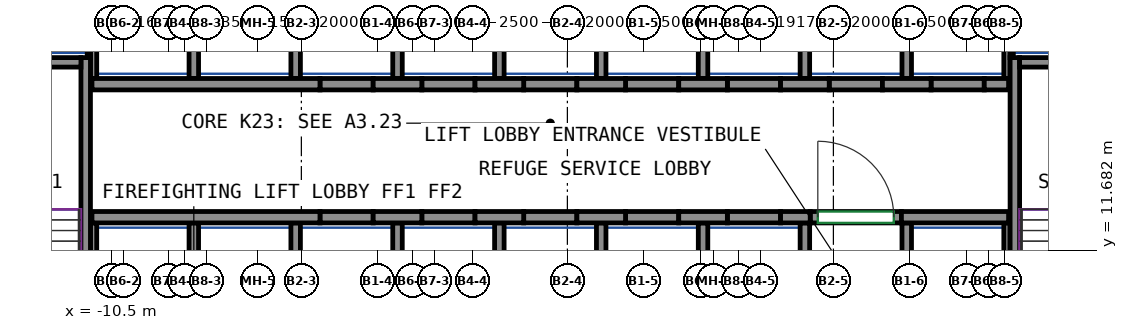
"""IFC4 building model, lengths in metres.
Left out: names, types, materials, properties, quantities, classifications, styles, units other than length and angle.
Written with IfcOpenShell. Run it as: python <this file> out.ifc"""

import sys

from ifc_helpers import new_model, si_unit, direction, frame, frame_2d, origin, place, context, subcontext, project, spatial, rectangle, extrude, source, transform, mapped, element, fill, save


model = new_model("IFC4")
c1 = context("Model", 3, precision=1e-05, world=origin(), true_north=direction((0.0, 1.0)))
c2 = subcontext(c1, "Body", "Model", "MODEL_VIEW")
j1 = project(units=[si_unit("LENGTHUNIT", "METRE"), si_unit("PLANEANGLEUNIT", "RADIAN")], contexts=[c1])
p1 = place(None, origin())
s1 = spatial("IfcSite", under=j1, at=p1, CompositionType="ELEMENT")
p2 = place(p1, origin())
s2 = spatial("IfcBuilding", under=s1, at=p2, CompositionType="ELEMENT")
p3 = place(p2, frame((0.0, 0.0, 95.2)))
s3 = spatial("IfcBuildingStorey", under=s2, at=p3, CompositionType="ELEMENT", Elevation=95.2)
m1 = source(origin(), c2, "Body", "SweptSolid", [
    extrude(rectangle(XDim=7.75, YDim=0.25, at=frame_2d((3.875, 0.0))), origin(), (0.0, 0.0, 1.0), 5.0),
])
p4 = place(p3, frame((-11.175, 9.0, 0.0), z_axis=(0.0, 0.0, 1.0), x_axis=(0.0, 1.0, 0.0)))
e1 = element("IfcWall", 1, at=p4, inside=s3, PredefinedType="SHEAR", context=c2, shape_type="MappedRepresentation", body=[
    mapped(m1, transform((0.0, 0.0, 0.0))),
])
m2 = source(origin(), c2, "Body", "SweptSolid", [
    extrude(rectangle(XDim=3.7, YDim=0.25, at=frame_2d((1.85, 0.0))), origin(), (0.0, 0.0, 1.0), 5.0),
])
p5 = place(p3, frame((-15.0, 16.625, 0.0), z_axis=(0.0, 0.0, 1.0), x_axis=(1.0, 0.0, 0.0)))
e2 = element("IfcWall", 2, at=p5, inside=s3, PredefinedType="SHEAR", context=c2, shape_type="MappedRepresentation", body=[
    mapped(m2, transform((0.0, 0.0, 0.0))),
])
p6 = place(p3, frame((13.275, 9.0, 0.0), z_axis=(0.0, 0.0, 1.0), x_axis=(0.0, 1.0, 0.0)))
e3 = element("IfcWall", 3, at=p6, inside=s3, PredefinedType="SHEAR", context=c2, shape_type="MappedRepresentation", body=[
    mapped(m1, transform((0.0, 0.0, 0.0))),
])
m3 = source(origin(), c2, "Body", "SweptSolid", [
    extrude(rectangle(XDim=3.7, YDim=0.25, at=frame_2d((1.85, 0.0))), origin(), (0.0, 0.0, 1.0), 5.0),
])
p7 = place(p3, frame((13.4, 16.625, 0.0), z_axis=(0.0, 0.0, 1.0), x_axis=(1.0, 0.0, 0.0)))
e4 = element("IfcWall", 4, at=p7, inside=s3, PredefinedType="SHEAR", context=c2, shape_type="MappedRepresentation", body=[
    mapped(m3, transform((0.0, 0.0, 0.0))),
])
m4 = source(origin(), c2, "Body", "SweptSolid", [
    extrude(rectangle(XDim=6.0, YDim=0.3, at=frame_2d((3.0, 0.0))), origin(), (0.0, 0.0, 1.0), 5.0),
])
p8 = place(p3, frame((-11.01, 12.55, 0.0), z_axis=(0.0, 0.0, 1.0), x_axis=(1.0, 0.0, 0.0)))
e5 = element("IfcWall", 5, at=p8, inside=s3, PredefinedType="SHEAR", context=c2, shape_type="MappedRepresentation", body=[
    mapped(m4, transform((0.0, 0.0, 0.0))),
])
m5 = source(origin(), c2, "Body", "SweptSolid", [
    extrude(rectangle(XDim=1.28, YDim=0.3, at=frame_2d((0.64, 0.0))), origin(), (0.0, 0.0, 1.0), 5.0),
])
for number, where, z_axis, x_axis in (
    (6, (-3.61, 12.55, 0.0), (0.0, 0.0, 1.0), (1.0, 0.0, 0.0)),
    (7, (-0.93, 12.55, 0.0), (0.0, 0.0, 1.0), (1.0, 0.0, 0.0)),
    (8, (1.75, 12.55, 0.0), (0.0, 0.0, 1.0), (1.0, 0.0, 0.0)),
    (9, (4.43, 12.55, 0.0), (0.0, 0.0, 1.0), (1.0, 0.0, 0.0)),
):
    element("IfcWall", number, at=place(p3, frame(where, z_axis=z_axis, x_axis=x_axis)), inside=s3, PredefinedType="SHEAR", context=c2, shape_type="MappedRepresentation", body=[
        mapped(m5, transform((0.0, 0.0, 0.0))),
    ])
m6 = source(origin(), c2, "Body", "SweptSolid", [
    extrude(rectangle(XDim=0.78, YDim=0.3, at=frame_2d((0.39, 0.0))), origin(), (0.0, 0.0, 1.0), 5.0),
])
p9 = place(p3, frame((7.11, 12.55, 0.0), z_axis=(0.0, 0.0, 1.0), x_axis=(1.0, 0.0, 0.0)))
e10 = element("IfcWall", 10, at=p9, inside=s3, PredefinedType="SHEAR", context=c2, shape_type="MappedRepresentation", body=[
    mapped(m6, transform((0.0, 0.0, 0.0))),
])
m7 = source(origin(), c2, "Body", "SweptSolid", [
    extrude(rectangle(XDim=2.82, YDim=0.3, at=frame_2d((1.41, 0.0))), origin(), (0.0, 0.0, 1.0), 5.0),
])
p10 = place(p3, frame((10.29, 12.55, 0.0), z_axis=(0.0, 0.0, 1.0), x_axis=(1.0, 0.0, 0.0)))
e11 = element("IfcWall", 11, at=p10, inside=s3, PredefinedType="SHEAR", context=c2, shape_type="MappedRepresentation", body=[
    mapped(m7, transform((0.0, 0.0, 0.0))),
])
p11 = place(p3, frame((-11.01, 16.05, 0.0), z_axis=(0.0, 0.0, 1.0), x_axis=(1.0, 0.0, 0.0)))
e12 = element("IfcWall", 12, at=p11, inside=s3, PredefinedType="SHEAR", context=c2, shape_type="MappedRepresentation", body=[
    mapped(m4, transform((0.0, 0.0, 0.0))),
])
for number, where, z_axis, x_axis in (
    (13, (-3.61, 16.05, 0.0), (0.0, 0.0, 1.0), (1.0, 0.0, 0.0)),
    (14, (-0.93, 16.05, 0.0), (0.0, 0.0, 1.0), (1.0, 0.0, 0.0)),
    (15, (1.75, 16.05, 0.0), (0.0, 0.0, 1.0), (1.0, 0.0, 0.0)),
    (16, (4.43, 16.05, 0.0), (0.0, 0.0, 1.0), (1.0, 0.0, 0.0)),
):
    element("IfcWall", number, at=place(p3, frame(where, z_axis=z_axis, x_axis=x_axis)), inside=s3, PredefinedType="SHEAR", context=c2, shape_type="MappedRepresentation", body=[
        mapped(m5, transform((0.0, 0.0, 0.0))),
    ])
m8 = source(origin(), c2, "Body", "SweptSolid", [
    extrude(rectangle(XDim=1.28, YDim=0.3, at=frame_2d((0.64, 0.0))), origin(), (0.0, 0.0, 1.0), 5.0),
])
p12 = place(p3, frame((7.11, 16.05, 0.0), z_axis=(0.0, 0.0, 1.0), x_axis=(1.0, 0.0, 0.0)))
e17 = element("IfcWall", 17, at=p12, inside=s3, PredefinedType="SHEAR", context=c2, shape_type="MappedRepresentation", body=[
    mapped(m8, transform((0.0, 0.0, 0.0))),
])
p13 = place(p3, frame((9.79, 16.05, 0.0), z_axis=(0.0, 0.0, 1.0), x_axis=(1.0, 0.0, 0.0)))
e18 = element("IfcWall", 18, at=p13, inside=s3, PredefinedType="SHEAR", context=c2, shape_type="MappedRepresentation", body=[
    mapped(m5, transform((0.0, 0.0, 0.0))),
])
m9 = source(origin(), c2, "Body", "SweptSolid", [
    extrude(rectangle(XDim=0.64, YDim=0.3, at=frame_2d((0.32, 0.0))), origin(), (0.0, 0.0, 1.0), 5.0),
])
p14 = place(p3, frame((12.47, 16.05, 0.0), z_axis=(0.0, 0.0, 1.0), x_axis=(1.0, 0.0, 0.0)))
e19 = element("IfcWall", 19, at=p14, inside=s3, PredefinedType="SHEAR", context=c2, shape_type="MappedRepresentation", body=[
    mapped(m9, transform((0.0, 0.0, 0.0))),
])
m10 = source(origin(), c2, "Body", "SweptSolid", [
    extrude(rectangle(XDim=1.4, YDim=0.3, at=frame_2d((0.7, 0.0))), origin(), (0.0, 0.0, 1.0), 5.0),
])
p15 = place(p3, frame((-5.01, 12.55, 0.0), z_axis=(0.0, 0.0, 1.0), x_axis=(1.0, 0.0, 0.0)))
e20 = element("IfcWall", 20, at=p15, inside=s3, PredefinedType="PARTITIONING", context=c2, shape_type="MappedRepresentation", body=[
    mapped(m10, transform((0.0, 0.0, 0.0))),
])
m11 = source(origin(), c2, "Body", "SweptSolid", [
    extrude(rectangle(XDim=1.4, YDim=0.3, at=frame_2d((0.7, 0.0))), origin(), (0.0, 0.0, 1.0), 5.0),
])
p16 = place(p3, frame((-2.33, 12.55, 0.0), z_axis=(0.0, 0.0, 1.0), x_axis=(1.0, 0.0, 0.0)))
e21 = element("IfcWall", 21, at=p16, inside=s3, PredefinedType="PARTITIONING", context=c2, shape_type="MappedRepresentation", body=[
    mapped(m11, transform((0.0, 0.0, 0.0))),
])
for number, where, z_axis, x_axis in (
    (22, (0.35, 12.55, 0.0), (0.0, 0.0, 1.0), (1.0, 0.0, 0.0)),
    (23, (3.03, 12.55, 0.0), (0.0, 0.0, 1.0), (1.0, 0.0, 0.0)),
):
    element("IfcWall", number, at=place(p3, frame(where, z_axis=z_axis, x_axis=x_axis)), inside=s3, PredefinedType="PARTITIONING", context=c2, shape_type="MappedRepresentation", body=[
        mapped(m10, transform((0.0, 0.0, 0.0))),
    ])
p17 = place(p3, frame((5.71, 12.55, 0.0), z_axis=(0.0, 0.0, 1.0), x_axis=(1.0, 0.0, 0.0)))
e24 = element("IfcWall", 24, at=p17, inside=s3, PredefinedType="PARTITIONING", context=c2, shape_type="MappedRepresentation", body=[
    mapped(m11, transform((0.0, 0.0, 0.0))),
])
p18 = place(p3, frame((11.07, 16.05, 0.0), z_axis=(0.0, 0.0, 1.0), x_axis=(1.0, 0.0, 0.0)))
e25 = element("IfcWall", 25, at=p18, inside=s3, PredefinedType="PARTITIONING", context=c2, shape_type="MappedRepresentation", body=[
    mapped(m10, transform((0.0, 0.0, 0.0))),
])
m12 = source(origin(), c2, "Body", "SweptSolid", [
    extrude(rectangle(XDim=2.4, YDim=0.3, at=frame_2d((1.2, 0.0))), origin(), (0.0, 0.0, 1.0), 5.0),
])
p19 = place(p3, frame((7.89, 12.55, 0.0), z_axis=(0.0, 0.0, 1.0), x_axis=(1.0, 0.0, 0.0)))
e26 = element("IfcWall", 26, at=p19, inside=s3, PredefinedType="PARTITIONING", context=c2, shape_type="MappedRepresentation", body=[
    mapped(m12, transform((0.0, 0.0, 0.0))),
])
p20 = place(p19, frame((0.2, 0.0, 0.0)))
e27 = element("IfcOpeningElement", 27, at=p20, cuts=e26, PredefinedType="OPENING", context=c2, shape_type="SweptSolid", body=[
    extrude(rectangle(XDim=2.0, YDim=2.1, at=frame_2d((1.0, 1.05))), frame((0.0, 0.16, 0.0), z_axis=(0.0, -1.0, 0.0), x_axis=(1.0, 0.0, 0.0)), (0.0, 0.0, 1.0), 0.32),
])
p21 = place(p3, frame((-5.01, 16.05, 0.0), z_axis=(0.0, 0.0, 1.0), x_axis=(1.0, 0.0, 0.0)))
e28 = element("IfcWall", 28, at=p21, inside=s3, PredefinedType="PARTITIONING", context=c2, shape_type="MappedRepresentation", body=[
    mapped(m10, transform((0.0, 0.0, 0.0))),
])
p22 = place(p3, frame((-2.33, 16.05, 0.0), z_axis=(0.0, 0.0, 1.0), x_axis=(1.0, 0.0, 0.0)))
e29 = element("IfcWall", 29, at=p22, inside=s3, PredefinedType="PARTITIONING", context=c2, shape_type="MappedRepresentation", body=[
    mapped(m11, transform((0.0, 0.0, 0.0))),
])
for number, where, z_axis, x_axis in (
    (30, (0.35, 16.05, 0.0), (0.0, 0.0, 1.0), (1.0, 0.0, 0.0)),
    (31, (3.03, 16.05, 0.0), (0.0, 0.0, 1.0), (1.0, 0.0, 0.0)),
):
    element("IfcWall", number, at=place(p3, frame(where, z_axis=z_axis, x_axis=x_axis)), inside=s3, PredefinedType="PARTITIONING", context=c2, shape_type="MappedRepresentation", body=[
        mapped(m10, transform((0.0, 0.0, 0.0))),
    ])
for number, where, z_axis, x_axis in (
    (32, (5.71, 16.05, 0.0), (0.0, 0.0, 1.0), (1.0, 0.0, 0.0)),
    (33, (8.39, 16.05, 0.0), (0.0, 0.0, 1.0), (1.0, 0.0, 0.0)),
):
    element("IfcWall", number, at=place(p3, frame(where, z_axis=z_axis, x_axis=x_axis)), inside=s3, PredefinedType="PARTITIONING", context=c2, shape_type="MappedRepresentation", body=[
        mapped(m11, transform((0.0, 0.0, 0.0))),
    ])
m13 = source(origin(), c2, "Body", "SweptSolid", [
    extrude(rectangle(XDim=3.275, YDim=0.165, at=frame_2d((1.638, 0.0))), origin(), (0.0, 0.0, 1.0), 5.0),
])
for number, where, z_axis, x_axis in (
    (34, (13.067, 16.2, 0.0), (0.0, 0.0, 1.0), (0.0, 1.0, 0.0)),
    (35, (-10.968, 16.2, 0.0), (0.0, 0.0, 1.0), (0.0, 1.0, 0.0)),
):
    element("IfcWall", number, at=place(p3, frame(where, z_axis=z_axis, x_axis=x_axis)), inside=s3, PredefinedType="PARTITIONING", context=c2, shape_type="MappedRepresentation", body=[
        mapped(m13, transform((0.0, 0.0, 0.0))),
    ])
m14 = source(origin(), c2, "Body", "SweptSolid", [
    extrude(rectangle(XDim=3.275, YDim=0.25, at=frame_2d((1.638, 0.0))), origin(), (0.0, 0.0, 1.0), 5.0),
])
p23 = place(p3, frame((10.43, 16.2, 0.0), z_axis=(0.0, 0.0, 1.0), x_axis=(0.0, 1.0, 0.0)))
e36 = element("IfcWall", 36, at=p23, inside=s3, PredefinedType="PARTITIONING", context=c2, shape_type="MappedRepresentation", body=[
    mapped(m14, transform((0.0, 0.0, 0.0))),
])
m15 = source(origin(), c2, "Body", "SweptSolid", [
    extrude(rectangle(XDim=2.725, YDim=0.085, at=frame_2d((1.363, 0.0))), origin(), (0.0, 0.0, 1.0), 5.0),
])
p24 = place(p3, frame((13.192, 16.75, 0.0), z_axis=(0.0, 0.0, 1.0), x_axis=(0.0, 1.0, 0.0)))
e37 = element("IfcWall", 37, at=p24, inside=s3, PredefinedType="PARTITIONING", context=c2, shape_type="MappedRepresentation", body=[
    mapped(m15, transform((0.0, 0.0, 0.0))),
])
for number, where, z_axis, x_axis in (
    (38, (2.39, 16.2, 0.0), (0.0, 0.0, 1.0), (0.0, 1.0, 0.0)),
    (39, (5.07, 16.2, 0.0), (0.0, 0.0, 1.0), (0.0, 1.0, 0.0)),
    (40, (7.75, 16.2, 0.0), (0.0, 0.0, 1.0), (0.0, 1.0, 0.0)),
    (41, (-0.29, 16.2, 0.0), (0.0, 0.0, 1.0), (0.0, 1.0, 0.0)),
):
    element("IfcWall", number, at=place(p3, frame(where, z_axis=z_axis, x_axis=x_axis)), inside=s3, PredefinedType="PARTITIONING", context=c2, shape_type="MappedRepresentation", body=[
        mapped(m14, transform((0.0, 0.0, 0.0))),
    ])
p25 = place(p3, frame((-11.093, 16.75, 0.0), z_axis=(0.0, 0.0, 1.0), x_axis=(0.0, 1.0, 0.0)))
e42 = element("IfcWall", 42, at=p25, inside=s3, PredefinedType="PARTITIONING", context=c2, shape_type="MappedRepresentation", body=[
    mapped(m15, transform((0.0, 0.0, 0.0))),
])
for number, where, z_axis, x_axis in (
    (43, (-2.97, 16.2, 0.0), (0.0, 0.0, 1.0), (0.0, 1.0, 0.0)),
    (44, (-5.65, 16.2, 0.0), (0.0, 0.0, 1.0), (0.0, 1.0, 0.0)),
    (45, (-8.33, 16.2, 0.0), (0.0, 0.0, 1.0), (0.0, 1.0, 0.0)),
):
    element("IfcWall", number, at=place(p3, frame(where, z_axis=z_axis, x_axis=x_axis)), inside=s3, PredefinedType="PARTITIONING", context=c2, shape_type="MappedRepresentation", body=[
        mapped(m14, transform((0.0, 0.0, 0.0))),
    ])
m16 = source(origin(), c2, "Body", "SweptSolid", [
    extrude(rectangle(XDim=3.4, YDim=0.25, at=frame_2d((1.7, 0.0))), origin(), (0.0, 0.0, 1.0), 5.0),
])
p26 = place(p3, frame((10.43, 9.0, 0.0), z_axis=(0.0, 0.0, 1.0), x_axis=(0.0, 1.0, 0.0)))
e46 = element("IfcWall", 46, at=p26, inside=s3, PredefinedType="PARTITIONING", context=c2, shape_type="MappedRepresentation", body=[
    mapped(m16, transform((0.0, 0.0, 0.0))),
])
m17 = source(origin(), c2, "Body", "SweptSolid", [
    extrude(rectangle(XDim=3.4, YDim=0.165, at=frame_2d((1.7, 0.0))), origin(), (0.0, 0.0, 1.0), 5.0),
])
p27 = place(p3, frame((13.067, 9.0, 0.0), z_axis=(0.0, 0.0, 1.0), x_axis=(0.0, 1.0, 0.0)))
e47 = element("IfcWall", 47, at=p27, inside=s3, PredefinedType="PARTITIONING", context=c2, shape_type="MappedRepresentation", body=[
    mapped(m17, transform((0.0, 0.0, 0.0))),
])
for number, where, z_axis, x_axis in (
    (48, (2.39, 9.0, 0.0), (0.0, 0.0, 1.0), (0.0, 1.0, 0.0)),
    (49, (5.07, 9.0, 0.0), (0.0, 0.0, 1.0), (0.0, 1.0, 0.0)),
    (50, (7.75, 9.0, 0.0), (0.0, 0.0, 1.0), (0.0, 1.0, 0.0)),
    (51, (-0.29, 9.0, 0.0), (0.0, 0.0, 1.0), (0.0, 1.0, 0.0)),
):
    element("IfcWall", number, at=place(p3, frame(where, z_axis=z_axis, x_axis=x_axis)), inside=s3, PredefinedType="PARTITIONING", context=c2, shape_type="MappedRepresentation", body=[
        mapped(m16, transform((0.0, 0.0, 0.0))),
    ])
p28 = place(p3, frame((-10.968, 9.0, 0.0), z_axis=(0.0, 0.0, 1.0), x_axis=(0.0, 1.0, 0.0)))
e52 = element("IfcWall", 52, at=p28, inside=s3, PredefinedType="PARTITIONING", context=c2, shape_type="MappedRepresentation", body=[
    mapped(m17, transform((0.0, 0.0, 0.0))),
])
for number, where, z_axis, x_axis in (
    (53, (-2.97, 9.0, 0.0), (0.0, 0.0, 1.0), (0.0, 1.0, 0.0)),
    (54, (-5.65, 9.0, 0.0), (0.0, 0.0, 1.0), (0.0, 1.0, 0.0)),
    (55, (-8.33, 9.0, 0.0), (0.0, 0.0, 1.0), (0.0, 1.0, 0.0)),
):
    element("IfcWall", number, at=place(p3, frame(where, z_axis=z_axis, x_axis=x_axis)), inside=s3, PredefinedType="PARTITIONING", context=c2, shape_type="MappedRepresentation", body=[
        mapped(m16, transform((0.0, 0.0, 0.0))),
    ])
p29 = place(p20, origin())
e56 = element("IfcDoor", 56, at=p29, inside=s3, OperationType="DOUBLE_DOOR_SINGLE_SWING", PredefinedType="DOOR", context=c2, shape_type="SweptSolid", body=[
    extrude(rectangle(XDim=2.0, YDim=2.1, at=frame_2d((1.0, 1.05))), frame((0.0, 0.025, 0.0), z_axis=(0.0, -1.0, 0.0), x_axis=(1.0, 0.0, 0.0)), (0.0, 0.0, 1.0), 0.05),
])
fill(e27, e56)
save(model, sys.argv[1])
